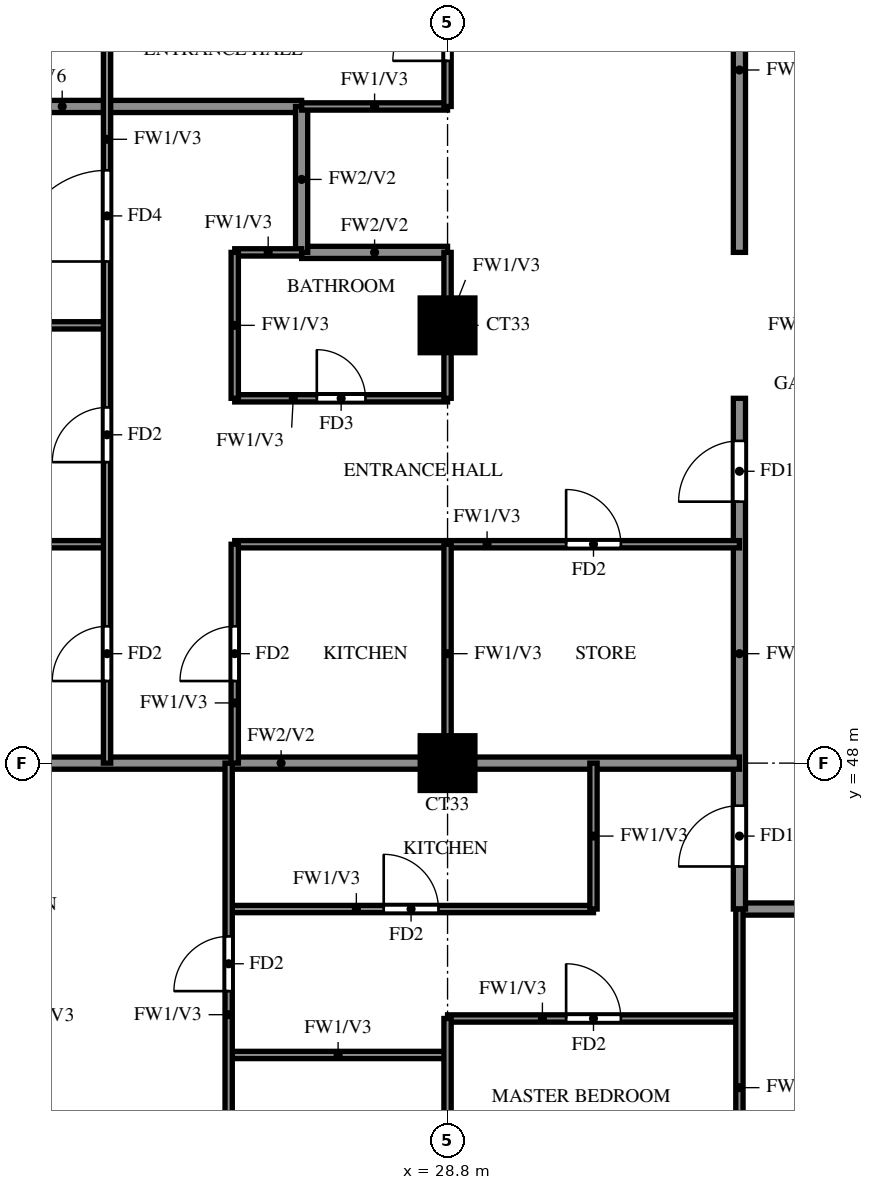
"""IFC4 building model, lengths in metres.
Left out: names, types, materials, properties, quantities, classifications, styles, units other than length and angle.
Written with IfcOpenShell. Run it as: python <this file> out.ifc"""

import sys

from ifc_helpers import new_model, si_unit, direction, frame, frame_2d, origin, origin_2d, place, context, subcontext, project, spatial, rectangle, extrude, source, transform, mapped, element, fill, save


model = new_model("IFC4")
c1 = context("Model", 3, precision=1e-05, world=origin(), true_north=direction((0.0, 1.0)))
c2 = subcontext(c1, "Body", "Model", "MODEL_VIEW")
j1 = project(units=[si_unit("LENGTHUNIT", "METRE"), si_unit("PLANEANGLEUNIT", "RADIAN")], contexts=[c1])
p1 = place(None, origin())
s1 = spatial("IfcSite", under=j1, at=p1, CompositionType="ELEMENT")
p2 = place(p1, origin())
s2 = spatial("IfcBuilding", under=s1, at=p2, CompositionType="ELEMENT")
p3 = place(p2, frame((0.0, 0.0, 218.5)))
s3 = spatial("IfcBuildingStorey", under=s2, at=p3, CompositionType="ELEMENT", Elevation=218.5)
m1 = source(origin(), c2, "Body", "SweptSolid", [
    extrude(rectangle(XDim=0.9, YDim=0.9, at=origin_2d()), origin(), (0.0, 0.0, 1.0), 3.22),
])
for number, where, z_axis, x_axis in (
    (1, (28.8, 48.0, 0.0), (0.0, 0.0, 1.0), (1.0, 0.0, 0.0)),
    (2, (28.8, 55.2, 0.0), (0.0, 0.0, 1.0), (1.0, 0.0, 0.0)),
):
    element("IfcColumn", number, at=place(p3, frame(where, z_axis=z_axis, x_axis=x_axis)), inside=s3, PredefinedType="COLUMN", context=c2, shape_type="MappedRepresentation", body=[
        mapped(m1, transform((0.0, 0.0, 0.0))),
    ])
p4 = place(p3, frame((33.6, 45.6, 0.0), z_axis=(0.0, 0.0, 1.0), x_axis=(1.0, 0.0, 0.0)))
e3 = element("IfcWall", 3, at=p4, inside=s3, PredefinedType="SOLIDWALL", context=c2, shape_type="SweptSolid", body=[
    extrude(rectangle(XDim=7.2, YDim=0.2, at=frame_2d((3.6, 0.0))), origin(), (0.0, 0.0, 1.0), 3.22),
])
p5 = place(p4, frame((3.15, 0.0, 0.0)))
e4 = element("IfcOpeningElement", 4, at=p5, cuts=e3, PredefinedType="OPENING", context=c2, shape_type="SweptSolid", body=[
    extrude(rectangle(XDim=0.9, YDim=2.1, at=frame_2d((0.45, 1.05))), frame((0.0, 0.11, 0.0), z_axis=(0.0, -1.0, 0.0), x_axis=(1.0, 0.0, 0.0)), (0.0, 0.0, 1.0), 0.22),
])
p6 = place(p3, frame((33.6, 45.6, 0.0), z_axis=(0.0, 0.0, 1.0), x_axis=(0.0, 1.0, 0.0)))
e5 = element("IfcWall", 5, at=p6, inside=s3, PredefinedType="SOLIDWALL", context=c2, shape_type="SweptSolid", body=[
    extrude(rectangle(XDim=8.4, YDim=0.2, at=frame_2d((4.2, 0.0))), origin(), (0.0, 0.0, 1.0), 3.22),
])
p7 = place(p6, frame((0.7, 0.0, 0.0)))
e6 = element("IfcOpeningElement", 6, at=p7, cuts=e5, PredefinedType="OPENING", context=c2, shape_type="SweptSolid", body=[
    extrude(rectangle(XDim=1.0, YDim=2.1, at=frame_2d((0.5, 1.05))), frame((0.0, 0.11, 0.0), z_axis=(0.0, -1.0, 0.0), x_axis=(1.0, 0.0, 0.0)), (0.0, 0.0, 1.0), 0.22),
])
p8 = place(p6, frame((6.7, 0.0, 0.0)))
e7 = element("IfcOpeningElement", 7, at=p8, cuts=e5, PredefinedType="OPENING", context=c2, shape_type="SweptSolid", body=[
    extrude(rectangle(XDim=1.0, YDim=2.1, at=frame_2d((0.5, 1.05))), frame((0.0, 0.11, 0.0), z_axis=(0.0, -1.0, 0.0), x_axis=(1.0, 0.0, 0.0)), (0.0, 0.0, 1.0), 0.22),
])
p9 = place(p3, frame((33.6, 56.4, 0.0), z_axis=(0.0, 0.0, 1.0), x_axis=(0.0, 1.0, 0.0)))
e8 = element("IfcWall", 8, at=p9, inside=s3, PredefinedType="SOLIDWALL", context=c2, shape_type="SweptSolid", body=[
    extrude(rectangle(XDim=6.0, YDim=0.2, at=frame_2d((3.0, 0.0))), origin(), (0.0, 0.0, 1.0), 3.22),
])
p10 = place(p9, frame((3.7, 0.0, 0.0)))
e9 = element("IfcOpeningElement", 9, at=p10, cuts=e8, PredefinedType="OPENING", context=c2, shape_type="SweptSolid", body=[
    extrude(rectangle(XDim=1.0, YDim=2.1, at=frame_2d((0.5, 1.05))), frame((0.0, 0.11, 0.0), z_axis=(0.0, -1.0, 0.0), x_axis=(1.0, 0.0, 0.0)), (0.0, 0.0, 1.0), 0.22),
])
p11 = place(p3, frame((18.525, 48.0, 0.0), z_axis=(0.0, 0.0, 1.0), x_axis=(1.0, 0.0, 0.0)))
e10 = element("IfcWall", 10, at=p11, inside=s3, PredefinedType="SOLIDWALL", context=c2, shape_type="SweptSolid", body=[
    extrude(rectangle(XDim=15.075, YDim=0.2, at=frame_2d((7.538, 0.0))), origin(), (0.0, 0.0, 1.0), 3.22),
])
p12 = place(p3, frame((26.4, 56.4, 0.0), z_axis=(0.0, 0.0, 1.0), x_axis=(1.0, 0.0, 0.0)))
e11 = element("IfcWall", 11, at=p12, inside=s3, PredefinedType="SOLIDWALL", context=c2, shape_type="SweptSolid", body=[
    extrude(rectangle(XDim=2.4, YDim=0.2, at=frame_2d((1.2, 0.0))), origin(), (0.0, 0.0, 1.0), 3.22),
])
p13 = place(p3, frame((18.525, 58.8, 0.0), z_axis=(0.0, 0.0, 1.0), x_axis=(1.0, 0.0, 0.0)))
e12 = element("IfcWall", 12, at=p13, inside=s3, PredefinedType="SOLIDWALL", context=c2, shape_type="SweptSolid", body=[
    extrude(rectangle(XDim=7.875, YDim=0.2, at=frame_2d((3.938, 0.0))), origin(), (0.0, 0.0, 1.0), 2.32),
])
p14 = place(p3, frame((26.4, 56.4, 0.0), z_axis=(0.0, 0.0, 1.0), x_axis=(0.0, 1.0, 0.0)))
e13 = element("IfcWall", 13, at=p14, inside=s3, PredefinedType="SOLIDWALL", context=c2, shape_type="SweptSolid", body=[
    extrude(rectangle(XDim=2.4, YDim=0.2, at=frame_2d((1.2, 0.0))), origin(), (0.0, 0.0, 1.0), 3.22),
])
p15 = place(p3, frame((25.2, 43.2, 0.0), z_axis=(0.0, 0.0, 1.0), x_axis=(1.0, 0.0, 0.0)))
e14 = element("IfcWall", 14, at=p15, inside=s3, PredefinedType="PARTITIONING", context=c2, shape_type="SweptSolid", body=[
    extrude(rectangle(XDim=3.6, YDim=0.12, at=frame_2d((1.8, 0.0))), origin(), (0.0, 0.0, 1.0), 3.22),
])
p16 = place(p3, frame((28.8, 43.8, 0.0), z_axis=(0.0, 0.0, 1.0), x_axis=(1.0, 0.0, 0.0)))
e15 = element("IfcWall", 15, at=p16, inside=s3, PredefinedType="PARTITIONING", context=c2, shape_type="SweptSolid", body=[
    extrude(rectangle(XDim=4.8, YDim=0.12, at=frame_2d((2.4, 0.0))), origin(), (0.0, 0.0, 1.0), 3.22),
])
p17 = place(p16, frame((1.95, 0.0, 0.0)))
e16 = element("IfcOpeningElement", 16, at=p17, cuts=e15, PredefinedType="OPENING", context=c2, shape_type="SweptSolid", body=[
    extrude(rectangle(XDim=0.9, YDim=2.1, at=frame_2d((0.45, 1.05))), frame((0.0, 0.07, 0.0), z_axis=(0.0, -1.0, 0.0), x_axis=(1.0, 0.0, 0.0)), (0.0, 0.0, 1.0), 0.14),
])
p18 = place(p3, frame((25.2, 45.6, 0.0), z_axis=(0.0, 0.0, 1.0), x_axis=(1.0, 0.0, 0.0)))
e17 = element("IfcWall", 17, at=p18, inside=s3, PredefinedType="PARTITIONING", context=c2, shape_type="SweptSolid", body=[
    extrude(rectangle(XDim=6.0, YDim=0.12, at=frame_2d((3.0, 0.0))), origin(), (0.0, 0.0, 1.0), 3.22),
])
p19 = place(p18, frame((2.55, 0.0, 0.0)))
e18 = element("IfcOpeningElement", 18, at=p19, cuts=e17, PredefinedType="OPENING", context=c2, shape_type="SweptSolid", body=[
    extrude(rectangle(XDim=0.9, YDim=2.1, at=frame_2d((0.45, 1.05))), frame((0.0, 0.07, 0.0), z_axis=(0.0, -1.0, 0.0), x_axis=(1.0, 0.0, 0.0)), (0.0, 0.0, 1.0), 0.14),
])
p20 = place(p3, frame((18.525, 51.6, 0.0), z_axis=(0.0, 0.0, 1.0), x_axis=(1.0, 0.0, 0.0)))
e19 = element("IfcWall", 19, at=p20, inside=s3, PredefinedType="PARTITIONING", context=c2, shape_type="SweptSolid", body=[
    extrude(rectangle(XDim=4.675, YDim=0.12, at=frame_2d((2.337, 0.0))), origin(), (0.0, 0.0, 1.0), 2.32),
])
p21 = place(p3, frame((25.3, 51.6, 0.0), z_axis=(0.0, 0.0, 1.0), x_axis=(1.0, 0.0, 0.0)))
e20 = element("IfcWall", 20, at=p21, inside=s3, PredefinedType="PARTITIONING", context=c2, shape_type="SweptSolid", body=[
    extrude(rectangle(XDim=8.3, YDim=0.12, at=frame_2d((4.15, 0.0))), origin(), (0.0, 0.0, 1.0), 3.22),
])
p22 = place(p21, frame((5.45, 0.0, 0.0)))
e21 = element("IfcOpeningElement", 21, at=p22, cuts=e20, PredefinedType="OPENING", context=c2, shape_type="SweptSolid", body=[
    extrude(rectangle(XDim=0.9, YDim=2.1, at=frame_2d((0.45, 1.05))), frame((0.0, 0.07, 0.0), z_axis=(0.0, -1.0, 0.0), x_axis=(1.0, 0.0, 0.0)), (0.0, 0.0, 1.0), 0.14),
])
p23 = place(p3, frame((25.3, 54.0, 0.0), z_axis=(0.0, 0.0, 1.0), x_axis=(1.0, 0.0, 0.0)))
e22 = element("IfcWall", 22, at=p23, inside=s3, PredefinedType="PARTITIONING", context=c2, shape_type="SweptSolid", body=[
    extrude(rectangle(XDim=3.5, YDim=0.12, at=frame_2d((1.75, 0.0))), origin(), (0.0, 0.0, 1.0), 3.22),
])
p24 = place(p23, frame((1.35, 0.0, 0.0)))
e23 = element("IfcOpeningElement", 23, at=p24, cuts=e22, PredefinedType="OPENING", context=c2, shape_type="SweptSolid", body=[
    extrude(rectangle(XDim=0.8, YDim=2.1, at=frame_2d((0.4, 1.05))), frame((0.0, 0.07, 0.0), z_axis=(0.0, -1.0, 0.0), x_axis=(1.0, 0.0, 0.0)), (0.0, 0.0, 1.0), 0.14),
])
p25 = place(p3, frame((18.525, 55.2, 0.0), z_axis=(0.0, 0.0, 1.0), x_axis=(1.0, 0.0, 0.0)))
e24 = element("IfcWall", 24, at=p25, inside=s3, PredefinedType="PARTITIONING", context=c2, shape_type="SweptSolid", body=[
    extrude(rectangle(XDim=4.675, YDim=0.12, at=frame_2d((2.337, 0.0))), origin(), (0.0, 0.0, 1.0), 3.22),
])
p26 = place(p3, frame((25.3, 56.4, 0.0), z_axis=(0.0, 0.0, 1.0), x_axis=(1.0, 0.0, 0.0)))
e25 = element("IfcWall", 25, at=p26, inside=s3, PredefinedType="PARTITIONING", context=c2, shape_type="SweptSolid", body=[
    extrude(rectangle(XDim=1.1, YDim=0.12, at=frame_2d((0.55, 0.0))), origin(), (0.0, 0.0, 1.0), 3.22),
])
p27 = place(p3, frame((26.4, 58.8, 0.0), z_axis=(0.0, 0.0, 1.0), x_axis=(1.0, 0.0, 0.0)))
e26 = element("IfcWall", 26, at=p27, inside=s3, PredefinedType="PARTITIONING", context=c2, shape_type="SweptSolid", body=[
    extrude(rectangle(XDim=2.4, YDim=0.12, at=frame_2d((1.2, 0.0))), origin(), (0.0, 0.0, 1.0), 3.22),
])
p28 = place(p3, frame((23.2, 48.0, 0.0), z_axis=(0.0, 0.0, 1.0), x_axis=(0.0, 1.0, 0.0)))
e27 = element("IfcWall", 27, at=p28, inside=s3, PredefinedType="PARTITIONING", context=c2, shape_type="SweptSolid", body=[
    extrude(rectangle(XDim=21.6, YDim=0.12, at=frame_2d((10.8, 0.0))), origin(), (0.0, 0.0, 1.0), 3.22),
])
p29 = place(p28, frame((1.35, 0.0, 0.0)))
e28 = element("IfcOpeningElement", 28, at=p29, cuts=e27, PredefinedType="OPENING", context=c2, shape_type="SweptSolid", body=[
    extrude(rectangle(XDim=0.9, YDim=2.1, at=frame_2d((0.45, 1.05))), frame((0.0, 0.07, 0.0), z_axis=(0.0, -1.0, 0.0), x_axis=(1.0, 0.0, 0.0)), (0.0, 0.0, 1.0), 0.14),
])
p30 = place(p28, frame((4.95, 0.0, 0.0)))
e29 = element("IfcOpeningElement", 29, at=p30, cuts=e27, PredefinedType="OPENING", context=c2, shape_type="SweptSolid", body=[
    extrude(rectangle(XDim=0.9, YDim=2.1, at=frame_2d((0.45, 1.05))), frame((0.0, 0.07, 0.0), z_axis=(0.0, -1.0, 0.0), x_axis=(1.0, 0.0, 0.0)), (0.0, 0.0, 1.0), 0.14),
])
p31 = place(p28, frame((8.25, 0.0, 0.0)))
e30 = element("IfcOpeningElement", 30, at=p31, cuts=e27, PredefinedType="OPENING", context=c2, shape_type="SweptSolid", body=[
    extrude(rectangle(XDim=1.5, YDim=2.1, at=frame_2d((0.75, 1.05))), frame((0.0, 0.07, 0.0), z_axis=(0.0, -1.0, 0.0), x_axis=(1.0, 0.0, 0.0)), (0.0, 0.0, 1.0), 0.14),
])
p32 = place(p28, frame((12.15, 0.0, 0.0)))
e31 = element("IfcOpeningElement", 31, at=p32, cuts=e27, PredefinedType="OPENING", context=c2, shape_type="SweptSolid", body=[
    extrude(rectangle(XDim=0.9, YDim=2.1, at=frame_2d((0.45, 1.05))), frame((0.0, 0.07, 0.0), z_axis=(0.0, -1.0, 0.0), x_axis=(1.0, 0.0, 0.0)), (0.0, 0.0, 1.0), 0.14),
])
p33 = place(p28, frame((17.55, 0.0, 0.0)))
e32 = element("IfcOpeningElement", 32, at=p33, cuts=e27, PredefinedType="OPENING", context=c2, shape_type="SweptSolid", body=[
    extrude(rectangle(XDim=0.9, YDim=2.1, at=frame_2d((0.45, 1.05))), frame((0.0, 0.07, 0.0), z_axis=(0.0, -1.0, 0.0), x_axis=(1.0, 0.0, 0.0)), (0.0, 0.0, 1.0), 0.14),
])
p34 = place(p3, frame((25.2, 39.725, 0.0), z_axis=(0.0, 0.0, 1.0), x_axis=(0.0, 1.0, 0.0)))
e33 = element("IfcWall", 33, at=p34, inside=s3, PredefinedType="PARTITIONING", context=c2, shape_type="SweptSolid", body=[
    extrude(rectangle(XDim=8.275, YDim=0.12, at=frame_2d((4.137, 0.0))), origin(), (0.0, 0.0, 1.0), 3.22),
])
p35 = place(p34, frame((4.525, 0.0, 0.0)))
e34 = element("IfcOpeningElement", 34, at=p35, cuts=e33, PredefinedType="OPENING", context=c2, shape_type="SweptSolid", body=[
    extrude(rectangle(XDim=0.9, YDim=2.1, at=frame_2d((0.45, 1.05))), frame((0.0, 0.07, 0.0), z_axis=(0.0, -1.0, 0.0), x_axis=(1.0, 0.0, 0.0)), (0.0, 0.0, 1.0), 0.14),
])
p36 = place(p3, frame((25.3, 48.0, 0.0), z_axis=(0.0, 0.0, 1.0), x_axis=(0.0, 1.0, 0.0)))
e35 = element("IfcWall", 35, at=p36, inside=s3, PredefinedType="PARTITIONING", context=c2, shape_type="SweptSolid", body=[
    extrude(rectangle(XDim=3.6, YDim=0.12, at=frame_2d((1.8, 0.0))), origin(), (0.0, 0.0, 1.0), 3.22),
])
p37 = place(p36, frame((1.35, 0.0, 0.0)))
e36 = element("IfcOpeningElement", 36, at=p37, cuts=e35, PredefinedType="OPENING", context=c2, shape_type="SweptSolid", body=[
    extrude(rectangle(XDim=0.9, YDim=2.1, at=frame_2d((0.45, 1.05))), frame((0.0, 0.07, 0.0), z_axis=(0.0, -1.0, 0.0), x_axis=(1.0, 0.0, 0.0)), (0.0, 0.0, 1.0), 0.14),
])
p38 = place(p3, frame((25.3, 54.0, 0.0), z_axis=(0.0, 0.0, 1.0), x_axis=(0.0, 1.0, 0.0)))
e37 = element("IfcWall", 37, at=p38, inside=s3, PredefinedType="PARTITIONING", context=c2, shape_type="SweptSolid", body=[
    extrude(rectangle(XDim=2.4, YDim=0.12, at=frame_2d((1.2, 0.0))), origin(), (0.0, 0.0, 1.0), 3.22),
])
p39 = place(p3, frame((28.8, 39.725, 0.0), z_axis=(0.0, 0.0, 1.0), x_axis=(0.0, 1.0, 0.0)))
e38 = element("IfcWall", 38, at=p39, inside=s3, PredefinedType="PARTITIONING", context=c2, shape_type="SweptSolid", body=[
    extrude(rectangle(XDim=4.075, YDim=0.12, at=frame_2d((2.038, 0.0))), origin(), (0.0, 0.0, 1.0), 3.22),
])
p40 = place(p39, frame((1.738, 0.0, 0.0)))
e39 = element("IfcOpeningElement", 39, at=p40, cuts=e38, PredefinedType="OPENING", context=c2, shape_type="SweptSolid", body=[
    extrude(rectangle(XDim=0.8, YDim=2.1, at=frame_2d((0.4, 1.05))), frame((0.0, 0.07, 0.0), z_axis=(0.0, -1.0, 0.0), x_axis=(1.0, 0.0, 0.0)), (0.0, 0.0, 1.0), 0.14),
])
p41 = place(p3, frame((28.8, 48.0, 0.0), z_axis=(0.0, 0.0, 1.0), x_axis=(0.0, 1.0, 0.0)))
e40 = element("IfcWall", 40, at=p41, inside=s3, PredefinedType="PARTITIONING", context=c2, shape_type="SweptSolid", body=[
    extrude(rectangle(XDim=3.6, YDim=0.12, at=frame_2d((1.8, 0.0))), origin(), (0.0, 0.0, 1.0), 3.22),
])
p42 = place(p3, frame((28.8, 54.0, 0.0), z_axis=(0.0, 0.0, 1.0), x_axis=(0.0, 1.0, 0.0)))
e41 = element("IfcWall", 41, at=p42, inside=s3, PredefinedType="PARTITIONING", context=c2, shape_type="SweptSolid", body=[
    extrude(rectangle(XDim=2.4, YDim=0.12, at=frame_2d((1.2, 0.0))), origin(), (0.0, 0.0, 1.0), 3.22),
])
p43 = place(p3, frame((28.8, 58.8, 0.0), z_axis=(0.0, 0.0, 1.0), x_axis=(0.0, 1.0, 0.0)))
e42 = element("IfcWall", 42, at=p43, inside=s3, PredefinedType="PARTITIONING", context=c2, shape_type="SweptSolid", body=[
    extrude(rectangle(XDim=3.6, YDim=0.12, at=frame_2d((1.8, 0.0))), origin(), (0.0, 0.0, 1.0), 3.22),
])
p44 = place(p43, frame((0.75, 0.0, 0.0)))
e43 = element("IfcOpeningElement", 43, at=p44, cuts=e42, PredefinedType="OPENING", context=c2, shape_type="SweptSolid", body=[
    extrude(rectangle(XDim=0.9, YDim=2.1, at=frame_2d((0.45, 1.05))), frame((0.0, 0.07, 0.0), z_axis=(0.0, -1.0, 0.0), x_axis=(1.0, 0.0, 0.0)), (0.0, 0.0, 1.0), 0.14),
])
p45 = place(p3, frame((31.2, 45.6, 0.0), z_axis=(0.0, 0.0, 1.0), x_axis=(0.0, 1.0, 0.0)))
e44 = element("IfcWall", 44, at=p45, inside=s3, PredefinedType="PARTITIONING", context=c2, shape_type="SweptSolid", body=[
    extrude(rectangle(XDim=2.4, YDim=0.12, at=frame_2d((1.2, 0.0))), origin(), (0.0, 0.0, 1.0), 3.22),
])
p46 = place(p3, frame((33.6, 39.725, 0.0), z_axis=(0.0, 0.0, 1.0), x_axis=(0.0, 1.0, 0.0)))
e45 = element("IfcWall", 45, at=p46, inside=s3, PredefinedType="PARTITIONING", context=c2, shape_type="SweptSolid", body=[
    extrude(rectangle(XDim=5.875, YDim=0.12, at=frame_2d((2.938, 0.0))), origin(), (0.0, 0.0, 1.0), 3.22),
])
p47 = place(p7, origin())
e46 = element("IfcDoor", 46, at=p47, inside=s3, OperationType="SINGLE_SWING_LEFT", PredefinedType="DOOR", context=c2, shape_type="SweptSolid", body=[
    extrude(rectangle(XDim=1.0, YDim=2.1, at=frame_2d((0.5, 1.05))), frame((0.0, 0.025, 0.0), z_axis=(0.0, -1.0, 0.0), x_axis=(1.0, 0.0, 0.0)), (0.0, 0.0, 1.0), 0.05),
])
fill(e6, e46)
p48 = place(p35, origin())
e47 = element("IfcDoor", 47, at=p48, inside=s3, OperationType="SINGLE_SWING_LEFT", PredefinedType="DOOR", context=c2, shape_type="SweptSolid", body=[
    extrude(rectangle(XDim=0.9, YDim=2.1, at=frame_2d((0.45, 1.05))), frame((0.0, 0.025, 0.0), z_axis=(0.0, -1.0, 0.0), x_axis=(1.0, 0.0, 0.0)), (0.0, 0.0, 1.0), 0.05),
])
fill(e34, e47)
p49 = place(p17, origin())
e48 = element("IfcDoor", 48, at=p49, inside=s3, OperationType="SINGLE_SWING_RIGHT", PredefinedType="DOOR", context=c2, shape_type="SweptSolid", body=[
    extrude(rectangle(XDim=0.9, YDim=2.1, at=frame_2d((0.45, 1.05))), frame((0.0, 0.025, 0.0), z_axis=(0.0, -1.0, 0.0), x_axis=(1.0, 0.0, 0.0)), (0.0, 0.0, 1.0), 0.05),
])
fill(e16, e48)
p50 = place(p19, origin())
e49 = element("IfcDoor", 49, at=p50, inside=s3, OperationType="SINGLE_SWING_LEFT", PredefinedType="DOOR", context=c2, shape_type="SweptSolid", body=[
    extrude(rectangle(XDim=0.9, YDim=2.1, at=frame_2d((0.45, 1.05))), frame((0.0, 0.025, 0.0), z_axis=(0.0, -1.0, 0.0), x_axis=(1.0, 0.0, 0.0)), (0.0, 0.0, 1.0), 0.05),
])
fill(e18, e49)
p51 = place(p8, origin())
e50 = element("IfcDoor", 50, at=p51, inside=s3, OperationType="SINGLE_SWING_LEFT", PredefinedType="DOOR", context=c2, shape_type="SweptSolid", body=[
    extrude(rectangle(XDim=1.0, YDim=2.1, at=frame_2d((0.5, 1.05))), frame((0.0, 0.025, 0.0), z_axis=(0.0, -1.0, 0.0), x_axis=(1.0, 0.0, 0.0)), (0.0, 0.0, 1.0), 0.05),
])
fill(e7, e50)
p52 = place(p29, origin())
e51 = element("IfcDoor", 51, at=p52, inside=s3, OperationType="SINGLE_SWING_LEFT", PredefinedType="DOOR", context=c2, shape_type="SweptSolid", body=[
    extrude(rectangle(XDim=0.9, YDim=2.1, at=frame_2d((0.45, 1.05))), frame((0.0, 0.025, 0.0), z_axis=(0.0, -1.0, 0.0), x_axis=(1.0, 0.0, 0.0)), (0.0, 0.0, 1.0), 0.05),
])
fill(e28, e51)
p53 = place(p30, origin())
e52 = element("IfcDoor", 52, at=p53, inside=s3, OperationType="SINGLE_SWING_RIGHT", PredefinedType="DOOR", context=c2, shape_type="SweptSolid", body=[
    extrude(rectangle(XDim=0.9, YDim=2.1, at=frame_2d((0.45, 1.05))), frame((0.0, 0.025, 0.0), z_axis=(0.0, -1.0, 0.0), x_axis=(1.0, 0.0, 0.0)), (0.0, 0.0, 1.0), 0.05),
])
fill(e29, e52)
p54 = place(p31, origin())
e53 = element("IfcDoor", 53, at=p54, inside=s3, OperationType="SINGLE_SWING_LEFT", PredefinedType="DOOR", context=c2, shape_type="SweptSolid", body=[
    extrude(rectangle(XDim=1.5, YDim=2.1, at=frame_2d((0.75, 1.05))), frame((0.0, 0.025, 0.0), z_axis=(0.0, -1.0, 0.0), x_axis=(1.0, 0.0, 0.0)), (0.0, 0.0, 1.0), 0.05),
])
fill(e30, e53)
p55 = place(p37, origin())
e54 = element("IfcDoor", 54, at=p55, inside=s3, OperationType="SINGLE_SWING_LEFT", PredefinedType="DOOR", context=c2, shape_type="SweptSolid", body=[
    extrude(rectangle(XDim=0.9, YDim=2.1, at=frame_2d((0.45, 1.05))), frame((0.0, 0.025, 0.0), z_axis=(0.0, -1.0, 0.0), x_axis=(1.0, 0.0, 0.0)), (0.0, 0.0, 1.0), 0.05),
])
fill(e36, e54)
p56 = place(p24, origin())
e55 = element("IfcDoor", 55, at=p56, inside=s3, OperationType="SINGLE_SWING_RIGHT", PredefinedType="DOOR", context=c2, shape_type="SweptSolid", body=[
    extrude(rectangle(XDim=0.8, YDim=2.1, at=frame_2d((0.4, 1.05))), frame((0.0, 0.025, 0.0), z_axis=(0.0, -1.0, 0.0), x_axis=(1.0, 0.0, 0.0)), (0.0, 0.0, 1.0), 0.05),
])
fill(e23, e55)
p57 = place(p22, origin())
e56 = element("IfcDoor", 56, at=p57, inside=s3, OperationType="SINGLE_SWING_LEFT", PredefinedType="DOOR", context=c2, shape_type="SweptSolid", body=[
    extrude(rectangle(XDim=0.9, YDim=2.1, at=frame_2d((0.45, 1.05))), frame((0.0, 0.025, 0.0), z_axis=(0.0, -1.0, 0.0), x_axis=(1.0, 0.0, 0.0)), (0.0, 0.0, 1.0), 0.05),
])
fill(e21, e56)
p58 = place(p44, origin())
e57 = element("IfcDoor", 57, at=p58, inside=s3, OperationType="SINGLE_SWING_LEFT", PredefinedType="DOOR", context=c2, shape_type="SweptSolid", body=[
    extrude(rectangle(XDim=0.9, YDim=2.1, at=frame_2d((0.45, 1.05))), frame((0.0, 0.025, 0.0), z_axis=(0.0, -1.0, 0.0), x_axis=(1.0, 0.0, 0.0)), (0.0, 0.0, 1.0), 0.05),
])
fill(e43, e57)
save(model, sys.argv[1])
